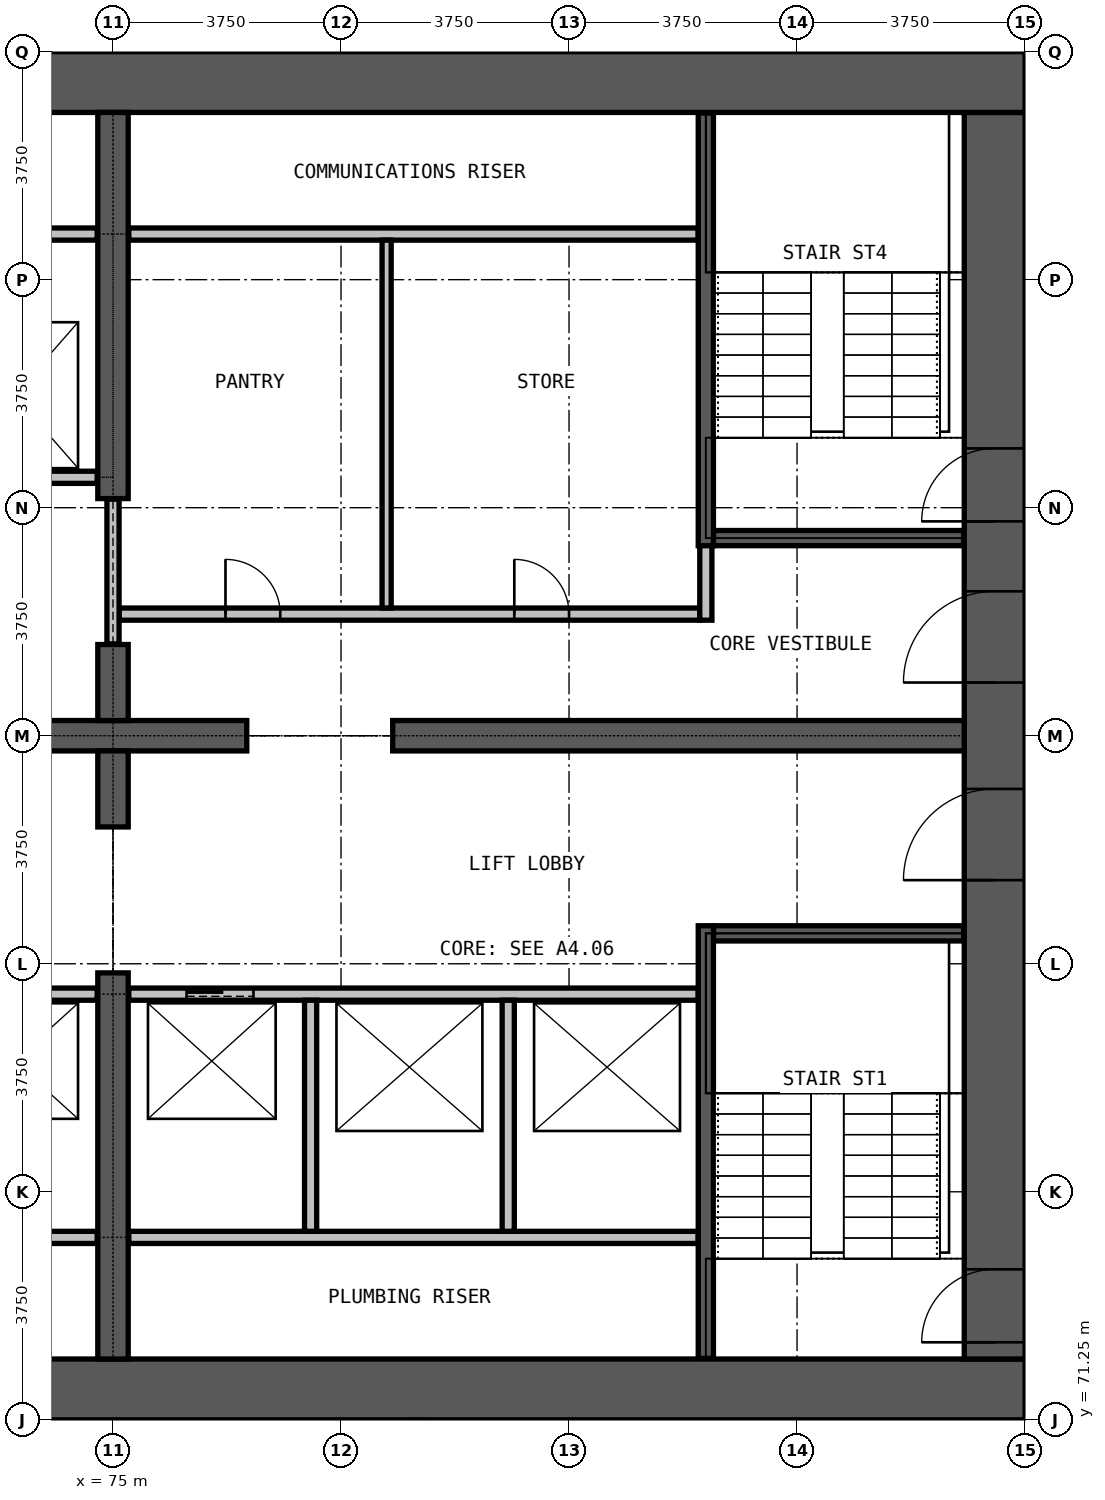
"""IFC4 building model, lengths in metres.
Left out: names, types, materials, properties, quantities, classifications, styles, units other than length and angle.
Written with IfcOpenShell. Run it as: python <this file> out.ifc"""

import sys

from ifc_helpers import new_model, si_unit, direction, frame, frame_2d, origin, place, context, subcontext, project, spatial, rectangle, extrude, element, fill, save


model = new_model("IFC4")
c1 = context("Model", 3, precision=1e-05, world=origin(), true_north=direction((0.0, 1.0)))
c2 = subcontext(c1, "Body", "Model", "MODEL_VIEW")
j1 = project(units=[si_unit("LENGTHUNIT", "METRE"), si_unit("PLANEANGLEUNIT", "RADIAN")], contexts=[c1])
p1 = place(None, origin())
s1 = spatial("IfcSite", under=j1, at=p1, CompositionType="ELEMENT")
p2 = place(p1, origin())
s2 = spatial("IfcBuilding", under=s1, at=p2, CompositionType="ELEMENT")
p3 = place(p2, frame((0.0, 0.0, 30.0)))
s3 = spatial("IfcBuildingStorey", under=s2, at=p3, CompositionType="ELEMENT", Elevation=30.0)
p4 = place(p3, frame((60.0, 71.75, 0.0), z_axis=(0.0, 0.0, 1.0), x_axis=(1.0, 0.0, 0.0)))
e1 = element("IfcWall", 1, at=p4, inside=s3, PredefinedType="SHEAR", context=c2, shape_type="SweptSolid", body=[
    extrude(rectangle(XDim=30.0, YDim=1.0, at=frame_2d((15.0, 0.0))), origin(), (0.0, 0.0, 1.0), 5.0),
])
p5 = place(p3, frame((89.5, 72.25, 0.0), z_axis=(0.0, 0.0, 1.0), x_axis=(0.0, 1.0, 0.0)))
e2 = element("IfcWall", 2, at=p5, inside=s3, PredefinedType="SHEAR", context=c2, shape_type="SweptSolid", body=[
    extrude(rectangle(XDim=20.5, YDim=1.0, at=frame_2d((10.25, 0.0))), origin(), (0.0, 0.0, 1.0), 5.0),
])
p6 = place(p5, frame((0.275, 0.0, 0.0)))
e3 = element("IfcOpeningElement", 3, at=p6, cuts=e2, PredefinedType="OPENING", context=c2, shape_type="SweptSolid", body=[
    extrude(rectangle(XDim=1.2, YDim=2.2, at=frame_2d((0.6, 1.1))), frame((0.0, 0.51, 0.0), z_axis=(0.0, -1.0, 0.0), x_axis=(1.0, 0.0, 0.0)), (0.0, 0.0, 1.0), 1.02),
])
p7 = place(p5, frame((13.775, 0.0, 0.0)))
e4 = element("IfcOpeningElement", 4, at=p7, cuts=e2, PredefinedType="OPENING", context=c2, shape_type="SweptSolid", body=[
    extrude(rectangle(XDim=1.2, YDim=2.2, at=frame_2d((0.6, 1.1))), frame((0.0, 0.51, 0.0), z_axis=(0.0, -1.0, 0.0), x_axis=(1.0, 0.0, 0.0)), (0.0, 0.0, 1.0), 1.02),
])
p8 = place(p5, frame((7.875, 0.0, 0.0)))
e5 = element("IfcOpeningElement", 5, at=p8, cuts=e2, PredefinedType="OPENING", context=c2, shape_type="SweptSolid", body=[
    extrude(rectangle(XDim=1.5, YDim=2.2, at=frame_2d((0.75, 1.1))), frame((0.0, 0.51, 0.0), z_axis=(0.0, -1.0, 0.0), x_axis=(1.0, 0.0, 0.0)), (0.0, 0.0, 1.0), 1.02),
])
p9 = place(p5, frame((11.125, 0.0, 0.0)))
e6 = element("IfcOpeningElement", 6, at=p9, cuts=e2, PredefinedType="OPENING", context=c2, shape_type="SweptSolid", body=[
    extrude(rectangle(XDim=1.5, YDim=2.2, at=frame_2d((0.75, 1.1))), frame((0.0, 0.51, 0.0), z_axis=(0.0, -1.0, 0.0), x_axis=(1.0, 0.0, 0.0)), (0.0, 0.0, 1.0), 1.02),
])
p10 = place(p3, frame((90.0, 93.25, 0.0), z_axis=(0.0, 0.0, 1.0), x_axis=(-1.0, 0.0, 0.0)))
e7 = element("IfcWall", 7, at=p10, inside=s3, PredefinedType="SHEAR", context=c2, shape_type="SweptSolid", body=[
    extrude(rectangle(XDim=30.0, YDim=1.0, at=frame_2d((15.0, 0.0))), origin(), (0.0, 0.0, 1.0), 5.0),
])
p11 = place(p3, frame((72.8, 82.5, 0.0), z_axis=(0.0, 0.0, 1.0), x_axis=(1.0, 0.0, 0.0)))
e8 = element("IfcWall", 8, at=p11, inside=s3, PredefinedType="SHEAR", context=c2, shape_type="SweptSolid", body=[
    extrude(rectangle(XDim=4.4, YDim=0.5, at=frame_2d((2.2, 0.0))), origin(), (0.0, 0.0, 1.0), 5.0),
])
p12 = place(p3, frame((79.6, 82.5, 0.0), z_axis=(0.0, 0.0, 1.0), x_axis=(1.0, 0.0, 0.0)))
e9 = element("IfcWall", 9, at=p12, inside=s3, PredefinedType="SHEAR", context=c2, shape_type="SweptSolid", body=[
    extrude(rectangle(XDim=9.4, YDim=0.5, at=frame_2d((4.7, 0.0))), origin(), (0.0, 0.0, 1.0), 5.0),
])
p13 = place(p3, frame((75.0, 72.25, 0.0), z_axis=(0.0, 0.0, 1.0), x_axis=(0.0, 1.0, 0.0)))
e10 = element("IfcWall", 10, at=p13, inside=s3, PredefinedType="SHEAR", context=c2, shape_type="SweptSolid", body=[
    extrude(rectangle(XDim=6.35, YDim=0.5, at=frame_2d((3.175, 0.0))), origin(), (0.0, 0.0, 1.0), 5.0),
])
for number, where, z_axis, x_axis in (
    (11, (75.0, 81.0, 0.0), (0.0, 0.0, 1.0), (0.0, 1.0, 0.0)),
    (12, (75.0, 82.75, 0.0), (0.0, 0.0, 1.0), (0.0, 1.0, 0.0)),
):
    element("IfcWall", number, at=place(p3, frame(where, z_axis=z_axis, x_axis=x_axis)), inside=s3, PredefinedType="SHEAR", context=c2, shape_type="SweptSolid", body=[
        extrude(rectangle(XDim=1.25, YDim=0.5, at=frame_2d((0.625, 0.0))), origin(), (0.0, 0.0, 1.0), 5.0),
    ])
p14 = place(p3, frame((75.0, 86.4, 0.0), z_axis=(0.0, 0.0, 1.0), x_axis=(0.0, 1.0, 0.0)))
e13 = element("IfcWall", 13, at=p14, inside=s3, PredefinedType="SHEAR", context=c2, shape_type="SweptSolid", body=[
    extrude(rectangle(XDim=6.35, YDim=0.5, at=frame_2d((3.175, 0.0))), origin(), (0.0, 0.0, 1.0), 5.0),
])
p15 = place(p3, frame((75.1, 84.5, 0.0), z_axis=(0.0, 0.0, 1.0), x_axis=(1.0, 0.0, 0.0)))
e14 = element("IfcWall", 14, at=p15, inside=s3, PredefinedType="PARTITIONING", context=c2, shape_type="SweptSolid", body=[
    extrude(rectangle(XDim=9.55, YDim=0.2, at=frame_2d((4.775, 0.0))), origin(), (0.0, 0.0, 1.0), 4.7),
])
p16 = place(p15, frame((1.75, 0.0, 0.0)))
e15 = element("IfcOpeningElement", 15, at=p16, cuts=e14, PredefinedType="OPENING", context=c2, shape_type="SweptSolid", body=[
    extrude(rectangle(XDim=0.9, YDim=2.2, at=frame_2d((0.45, 1.1))), frame((0.0, 0.11, 0.0), z_axis=(0.0, -1.0, 0.0), x_axis=(1.0, 0.0, 0.0)), (0.0, 0.0, 1.0), 0.22),
])
p17 = place(p15, frame((6.5, 0.0, 0.0)))
e16 = element("IfcOpeningElement", 16, at=p17, cuts=e14, PredefinedType="OPENING", context=c2, shape_type="SweptSolid", body=[
    extrude(rectangle(XDim=0.9, YDim=2.2, at=frame_2d((0.45, 1.1))), frame((0.0, 0.11, 0.0), z_axis=(0.0, -1.0, 0.0), x_axis=(1.0, 0.0, 0.0)), (0.0, 0.0, 1.0), 0.22),
])
p18 = place(p3, frame((75.26, 90.75, 0.0), z_axis=(0.0, 0.0, 1.0), x_axis=(1.0, 0.0, 0.0)))
e17 = element("IfcWall", 17, at=p18, inside=s3, PredefinedType="PARTITIONING", context=c2, shape_type="SweptSolid", body=[
    extrude(rectangle(XDim=9.365, YDim=0.2, at=frame_2d((4.683, 0.0))), origin(), (0.0, 0.0, 1.0), 4.7),
])
p19 = place(p3, frame((75.0, 84.01, 0.0), z_axis=(0.0, 0.0, 1.0), x_axis=(0.0, 1.0, 0.0)))
e18 = element("IfcWall", 18, at=p19, inside=s3, PredefinedType="PARTITIONING", context=c2, shape_type="SweptSolid", body=[
    extrude(rectangle(XDim=2.38, YDim=0.2, at=frame_2d((1.19, 0.0))), origin(), (0.0, 0.0, 1.0), 2.4),
])
p20 = place(p3, frame((84.75, 84.4, 0.0), z_axis=(0.0, 0.0, 1.0), x_axis=(0.0, 1.0, 0.0)))
e19 = element("IfcWall", 19, at=p20, inside=s3, PredefinedType="PARTITIONING", context=c2, shape_type="SweptSolid", body=[
    extrude(rectangle(XDim=1.475, YDim=0.2, at=frame_2d((0.738, 0.0))), origin(), (0.0, 0.0, 1.0), 4.7),
])
p21 = place(p3, frame((79.5, 84.6, 0.0), z_axis=(0.0, 0.0, 1.0), x_axis=(0.0, 1.0, 0.0)))
e20 = element("IfcWall", 20, at=p21, inside=s3, PredefinedType="PARTITIONING", context=c2, shape_type="SweptSolid", body=[
    extrude(rectangle(XDim=6.05, YDim=0.15, at=frame_2d((3.025, 0.0))), origin(), (0.0, 0.0, 1.0), 4.7),
])
for number, where, z_axis, x_axis in (
    (21, (65.375, 74.25, 0.0), (0.0, 0.0, 1.0), (1.0, 0.0, 0.0)),
    (22, (75.26, 74.25, 0.0), (0.0, 0.0, 1.0), (1.0, 0.0, 0.0)),
):
    element("IfcWall", number, at=place(p3, frame(where, z_axis=z_axis, x_axis=x_axis)), inside=s3, PredefinedType="PARTITIONING", context=c2, shape_type="SweptSolid", body=[
        extrude(rectangle(XDim=9.365, YDim=0.2, at=frame_2d((4.683, 0.0))), origin(), (0.0, 0.0, 1.0), 4.7),
    ])
p22 = place(p3, frame((65.375, 78.25, 0.0), z_axis=(0.0, 0.0, 1.0), x_axis=(1.0, 0.0, 0.0)))
e23 = element("IfcWall", 23, at=p22, inside=s3, PredefinedType="PARTITIONING", context=c2, shape_type="SweptSolid", body=[
    extrude(rectangle(XDim=9.365, YDim=0.2, at=frame_2d((4.683, 0.0))), origin(), (0.0, 0.0, 1.0), 4.7),
])
p23 = place(p22, frame((1.0, 0.0, 0.0)))
e24 = element("IfcOpeningElement", 24, at=p23, cuts=e23, PredefinedType="OPENING", context=c2, shape_type="SweptSolid", body=[
    extrude(rectangle(XDim=1.1, YDim=2.2, at=frame_2d((0.55, 1.1))), frame((0.0, 0.11, 0.0), z_axis=(0.0, -1.0, 0.0), x_axis=(1.0, 0.0, 0.0)), (0.0, 0.0, 1.0), 0.22),
])
p24 = place(p22, frame((4.175, 0.0, 0.0)))
e25 = element("IfcOpeningElement", 25, at=p24, cuts=e23, PredefinedType="OPENING", context=c2, shape_type="SweptSolid", body=[
    extrude(rectangle(XDim=1.1, YDim=2.2, at=frame_2d((0.55, 1.1))), frame((0.0, 0.11, 0.0), z_axis=(0.0, -1.0, 0.0), x_axis=(1.0, 0.0, 0.0)), (0.0, 0.0, 1.0), 0.22),
])
p25 = place(p22, frame((7.325, 0.0, 0.0)))
e26 = element("IfcOpeningElement", 26, at=p25, cuts=e23, PredefinedType="OPENING", context=c2, shape_type="SweptSolid", body=[
    extrude(rectangle(XDim=1.1, YDim=2.2, at=frame_2d((0.55, 1.1))), frame((0.0, 0.11, 0.0), z_axis=(0.0, -1.0, 0.0), x_axis=(1.0, 0.0, 0.0)), (0.0, 0.0, 1.0), 0.22),
])
p26 = place(p3, frame((75.26, 78.25, 0.0), z_axis=(0.0, 0.0, 1.0), x_axis=(1.0, 0.0, 0.0)))
e27 = element("IfcWall", 27, at=p26, inside=s3, PredefinedType="PARTITIONING", context=c2, shape_type="SweptSolid", body=[
    extrude(rectangle(XDim=9.365, YDim=0.2, at=frame_2d((4.683, 0.0))), origin(), (0.0, 0.0, 1.0), 4.7),
])
p27 = place(p26, frame((0.95, 0.0, 0.0)))
e28 = element("IfcOpeningElement", 28, at=p27, cuts=e27, PredefinedType="OPENING", context=c2, shape_type="SweptSolid", body=[
    extrude(rectangle(XDim=1.1, YDim=2.2, at=frame_2d((0.55, 1.1))), frame((0.0, 0.11, 0.0), z_axis=(0.0, -1.0, 0.0), x_axis=(1.0, 0.0, 0.0)), (0.0, 0.0, 1.0), 0.22),
])
p28 = place(p3, frame((65.375, 86.75, 0.0), z_axis=(0.0, 0.0, 1.0), x_axis=(1.0, 0.0, 0.0)))
e29 = element("IfcWall", 29, at=p28, inside=s3, PredefinedType="PARTITIONING", context=c2, shape_type="SweptSolid", body=[
    extrude(rectangle(XDim=9.365, YDim=0.2, at=frame_2d((4.683, 0.0))), origin(), (0.0, 0.0, 1.0), 4.7),
])
p29 = place(p28, frame((1.0, 0.0, 0.0)))
e30 = element("IfcOpeningElement", 30, at=p29, cuts=e29, PredefinedType="OPENING", context=c2, shape_type="SweptSolid", body=[
    extrude(rectangle(XDim=1.1, YDim=2.2, at=frame_2d((0.55, 1.1))), frame((0.0, 0.11, 0.0), z_axis=(0.0, -1.0, 0.0), x_axis=(1.0, 0.0, 0.0)), (0.0, 0.0, 1.0), 0.22),
])
p30 = place(p28, frame((4.175, 0.0, 0.0)))
e31 = element("IfcOpeningElement", 31, at=p30, cuts=e29, PredefinedType="OPENING", context=c2, shape_type="SweptSolid", body=[
    extrude(rectangle(XDim=1.1, YDim=2.2, at=frame_2d((0.55, 1.1))), frame((0.0, 0.11, 0.0), z_axis=(0.0, -1.0, 0.0), x_axis=(1.0, 0.0, 0.0)), (0.0, 0.0, 1.0), 0.22),
])
p31 = place(p28, frame((7.325, 0.0, 0.0)))
e32 = element("IfcOpeningElement", 32, at=p31, cuts=e29, PredefinedType="OPENING", context=c2, shape_type="SweptSolid", body=[
    extrude(rectangle(XDim=1.1, YDim=2.2, at=frame_2d((0.55, 1.1))), frame((0.0, 0.11, 0.0), z_axis=(0.0, -1.0, 0.0), x_axis=(1.0, 0.0, 0.0)), (0.0, 0.0, 1.0), 0.22),
])
p32 = place(p3, frame((65.375, 90.75, 0.0), z_axis=(0.0, 0.0, 1.0), x_axis=(1.0, 0.0, 0.0)))
e33 = element("IfcWall", 33, at=p32, inside=s3, PredefinedType="PARTITIONING", context=c2, shape_type="SweptSolid", body=[
    extrude(rectangle(XDim=9.365, YDim=0.2, at=frame_2d((4.683, 0.0))), origin(), (0.0, 0.0, 1.0), 4.7),
])
for number, where, z_axis, x_axis in (
    (34, (78.25, 74.35, 0.0), (0.0, 0.0, 1.0), (0.0, 1.0, 0.0)),
    (35, (81.5, 74.35, 0.0), (0.0, 0.0, 1.0), (0.0, 1.0, 0.0)),
):
    element("IfcWall", number, at=place(p3, frame(where, z_axis=z_axis, x_axis=x_axis)), inside=s3, PredefinedType="PARTITIONING", context=c2, shape_type="SweptSolid", body=[
        extrude(rectangle(XDim=3.8, YDim=0.2, at=frame_2d((1.9, 0.0))), origin(), (0.0, 0.0, 1.0), 4.7),
    ])
for number, where, z_axis, x_axis in (
    (36, (84.875, 79.25, 0.0), (0.0, 0.0, 1.0), (1.0, 0.0, 0.0)),
    (37, (84.875, 85.75, 0.0), (0.0, 0.0, 1.0), (1.0, 0.0, 0.0)),
):
    element("IfcWall", number, at=place(p3, frame(where, z_axis=z_axis, x_axis=x_axis)), inside=s3, PredefinedType="PARTITIONING", context=c2, shape_type="SweptSolid", body=[
        extrude(rectangle(XDim=4.115, YDim=0.25, at=frame_2d((2.058, 0.0))), origin(), (0.0, 0.0, 1.0), 4.7),
    ])
for number, where, z_axis, x_axis in (
    (38, (84.75, 72.26, 0.0), (0.0, 0.0, 1.0), (0.0, 1.0, 0.0)),
    (39, (84.75, 85.625, 0.0), (0.0, 0.0, 1.0), (0.0, 1.0, 0.0)),
):
    element("IfcWall", number, at=place(p3, frame(where, z_axis=z_axis, x_axis=x_axis)), inside=s3, PredefinedType="PARTITIONING", context=c2, shape_type="SweptSolid", body=[
        extrude(rectangle(XDim=7.115, YDim=0.25, at=frame_2d((3.558, 0.0))), origin(), (0.0, 0.0, 1.0), 4.7),
    ])
p33 = place(p27, origin())
e40 = element("IfcDoor", 40, at=p33, inside=s3, OperationType="DOUBLE_DOOR_SLIDING", PredefinedType="DOOR", context=c2, shape_type="SweptSolid", body=[
    extrude(rectangle(XDim=1.1, YDim=2.2, at=frame_2d((0.55, 1.1))), frame((0.0, 0.025, 0.0), z_axis=(0.0, -1.0, 0.0), x_axis=(1.0, 0.0, 0.0)), (0.0, 0.0, 1.0), 0.05),
])
fill(e28, e40)
p34 = place(p6, origin())
e41 = element("IfcDoor", 41, at=p34, inside=s3, OperationType="SINGLE_SWING_LEFT", PredefinedType="DOOR", context=c2, shape_type="SweptSolid", body=[
    extrude(rectangle(XDim=1.2, YDim=2.2, at=frame_2d((0.6, 1.1))), frame((0.0, 0.025, 0.0), z_axis=(0.0, -1.0, 0.0), x_axis=(1.0, 0.0, 0.0)), (0.0, 0.0, 1.0), 0.05),
])
fill(e3, e41)
p35 = place(p7, origin())
e42 = element("IfcDoor", 42, at=p35, inside=s3, OperationType="SINGLE_SWING_LEFT", PredefinedType="DOOR", context=c2, shape_type="SweptSolid", body=[
    extrude(rectangle(XDim=1.2, YDim=2.2, at=frame_2d((0.6, 1.1))), frame((0.0, 0.025, 0.0), z_axis=(0.0, -1.0, 0.0), x_axis=(1.0, 0.0, 0.0)), (0.0, 0.0, 1.0), 0.05),
])
fill(e4, e42)
p36 = place(p8, origin())
e43 = element("IfcDoor", 43, at=p36, inside=s3, OperationType="DOUBLE_DOOR_SINGLE_SWING", PredefinedType="DOOR", context=c2, shape_type="SweptSolid", body=[
    extrude(rectangle(XDim=1.5, YDim=2.2, at=frame_2d((0.75, 1.1))), frame((0.0, 0.025, 0.0), z_axis=(0.0, -1.0, 0.0), x_axis=(1.0, 0.0, 0.0)), (0.0, 0.0, 1.0), 0.05),
])
fill(e5, e43)
p37 = place(p9, origin())
e44 = element("IfcDoor", 44, at=p37, inside=s3, OperationType="DOUBLE_DOOR_SINGLE_SWING", PredefinedType="DOOR", context=c2, shape_type="SweptSolid", body=[
    extrude(rectangle(XDim=1.5, YDim=2.2, at=frame_2d((0.75, 1.1))), frame((0.0, 0.025, 0.0), z_axis=(0.0, -1.0, 0.0), x_axis=(1.0, 0.0, 0.0)), (0.0, 0.0, 1.0), 0.05),
])
fill(e6, e44)
p38 = place(p16, origin())
e45 = element("IfcDoor", 45, at=p38, inside=s3, OperationType="SINGLE_SWING_LEFT", PredefinedType="DOOR", context=c2, shape_type="SweptSolid", body=[
    extrude(rectangle(XDim=0.9, YDim=2.2, at=frame_2d((0.45, 1.1))), frame((0.0, 0.025, 0.0), z_axis=(0.0, -1.0, 0.0), x_axis=(1.0, 0.0, 0.0)), (0.0, 0.0, 1.0), 0.05),
])
fill(e15, e45)
p39 = place(p17, origin())
e46 = element("IfcDoor", 46, at=p39, inside=s3, OperationType="SINGLE_SWING_LEFT", PredefinedType="DOOR", context=c2, shape_type="SweptSolid", body=[
    extrude(rectangle(XDim=0.9, YDim=2.2, at=frame_2d((0.45, 1.1))), frame((0.0, 0.025, 0.0), z_axis=(0.0, -1.0, 0.0), x_axis=(1.0, 0.0, 0.0)), (0.0, 0.0, 1.0), 0.05),
])
fill(e16, e46)
save(model, sys.argv[1])
